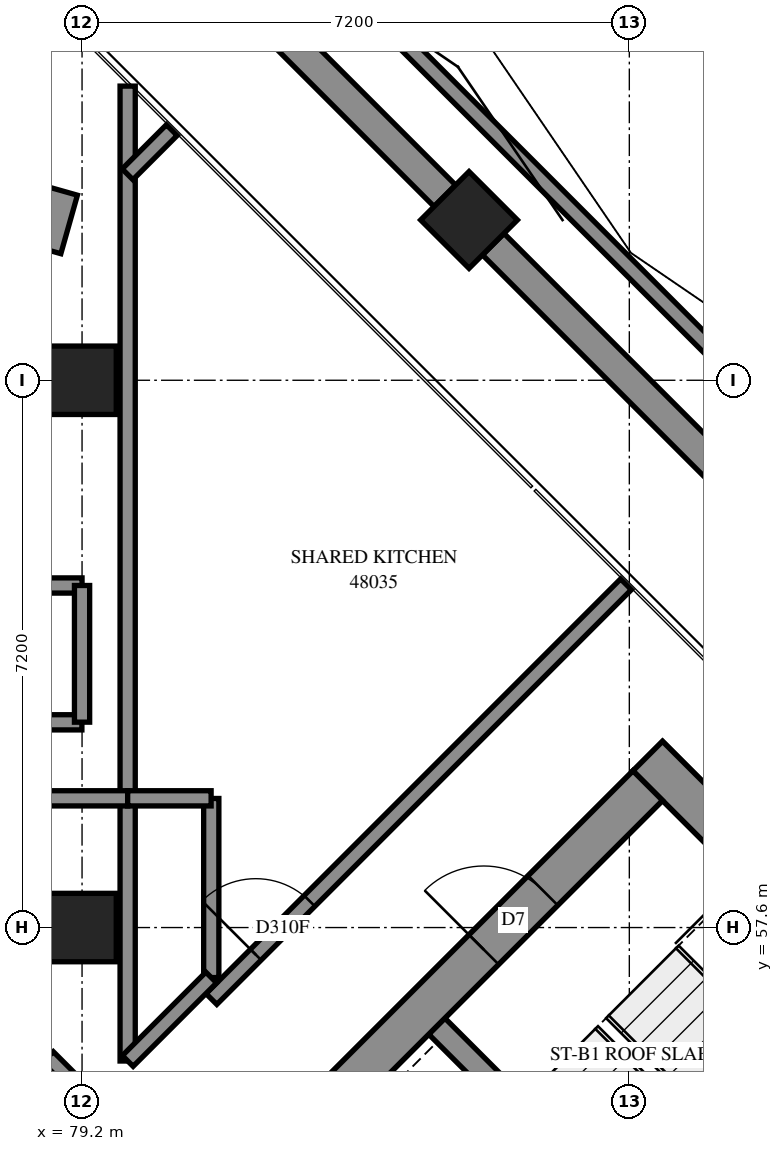
"""IFC4 building model, lengths in metres.
Left out: names, types, materials, properties, quantities, classifications, styles, units other than length and angle.
Written with IfcOpenShell. Run it as: python <this file> out.ifc"""

import sys

from ifc_helpers import new_model, si_unit, direction, frame, frame_2d, origin, origin_2d, place, context, subcontext, project, spatial, polyline, rectangle, outline, extrude, element, fill, save


model = new_model("IFC4")
c1 = context("Model", 3, precision=1e-05, world=origin(), true_north=direction((0.0, 1.0)))
c2 = subcontext(c1, "Body", "Model", "MODEL_VIEW")
j1 = project(units=[si_unit("LENGTHUNIT", "METRE"), si_unit("PLANEANGLEUNIT", "RADIAN")], contexts=[c1])
p1 = place(None, origin())
s1 = spatial("IfcSite", under=j1, at=p1, CompositionType="ELEMENT")
p2 = place(p1, origin())
s2 = spatial("IfcBuilding", under=s1, at=p2, CompositionType="ELEMENT")
p3 = place(p2, frame((0.0, 0.0, 176.2)))
s3 = spatial("IfcBuildingStorey", under=s2, at=p3, CompositionType="ELEMENT", Elevation=176.2)
for number, where, z_axis, x_axis in (
    (1, (79.2, 57.6, 0.0), (0.0, 0.0, 1.0), (1.0, 0.0, 0.0)),
    (2, (79.2, 64.8, 0.0), (0.0, 0.0, 1.0), (1.0, 0.0, 0.0)),
    (3, (84.291, 66.909, 0.0), (0.0, 0.0, 1.0), (0.707, -0.707, 0.0)),
):
    element("IfcColumn", number, at=place(p3, frame(where, z_axis=z_axis, x_axis=x_axis)), inside=s3, PredefinedType="COLUMN", context=c2, shape_type="SweptSolid", body=[
        extrude(rectangle(XDim=0.9, YDim=0.9, at=origin_2d()), origin(), (0.0, 0.0, 1.0), 3.9),
    ])
p4 = place(p3, frame((86.642, 59.855, -0.3), z_axis=(0.0, 0.0, 1.0), x_axis=(0.707110007, -0.7071035554, 0.0)))
e4 = element("IfcWall", 4, at=p4, inside=s3, PredefinedType="SHEAR", context=c2, shape_type="SweptSolid", body=[
    extrude(rectangle(XDim=15.5, YDim=0.55, at=frame_2d((7.75, 0.0))), origin(), (0.0, 0.0, 1.0), 3.5),
])
p5 = place(p4, frame((10.55, 0.0, 0.3)))
e5 = element("IfcOpeningElement", 5, at=p5, cuts=e4, PredefinedType="OPENING", context=c2, shape_type="SweptSolid", body=[
    extrude(rectangle(XDim=0.8, YDim=2.1, at=frame_2d((0.4, 1.05))), frame((0.0, 0.285, 0.0), z_axis=(0.0, -1.0, 0.0), x_axis=(1.0, 0.0, 0.0)), (0.0, 0.0, 1.0), 0.57),
])
p6 = place(p3, frame((76.46, 49.284, -0.3), z_axis=(0.0, 0.0, 1.0), x_axis=(0.7071067812, 0.7071067812, 0.0)))
e6 = element("IfcWall", 6, at=p6, inside=s3, PredefinedType="SHEAR", context=c2, shape_type="SweptSolid", body=[
    extrude(rectangle(XDim=14.4, YDim=0.55, at=frame_2d((7.2, 0.0))), origin(), (0.0, 0.0, 1.0), 3.5),
])
p7 = place(p6, frame((4.55, 0.0, 0.3)))
e7 = element("IfcOpeningElement", 7, at=p7, cuts=e6, PredefinedType="OPENING", context=c2, shape_type="SweptSolid", body=[
    extrude(rectangle(XDim=1.1, YDim=2.1, at=frame_2d((0.55, 1.05))), frame((0.0, 0.285, 0.0), z_axis=(0.0, -1.0, 0.0), x_axis=(1.0, 0.0, 0.0)), (0.0, 0.0, 1.0), 0.57),
])
p8 = place(p6, frame((11.35, 0.0, 0.3)))
e8 = element("IfcOpeningElement", 8, at=p8, cuts=e6, PredefinedType="OPENING", context=c2, shape_type="SweptSolid", body=[
    extrude(rectangle(XDim=1.1, YDim=2.1, at=frame_2d((0.55, 1.05))), frame((0.0, 0.285, 0.0), z_axis=(0.0, -1.0, 0.0), x_axis=(1.0, 0.0, 0.0)), (0.0, 0.0, 1.0), 0.57),
])
p9 = place(p3, frame((83.867, 56.302, 0.0), z_axis=(0.0, 0.0, 1.0), x_axis=(0.7071137256, -0.7070998367, 0.0)))
e9 = element("IfcWall", 9, at=p9, inside=s3, PredefinedType="SOLIDWALL", context=c2, shape_type="SweptSolid", body=[
    extrude(rectangle(XDim=7.2, YDim=0.3, at=frame_2d((3.6, 0.0))), origin(), (0.0, 0.0, 1.0), 3.9),
])
p10 = place(p3, frame((79.03, 66.85, 0.0), z_axis=(0.0, 0.0, 1.0), x_axis=(-0.9622591579, 0.2721347332, 0.0)))
e10 = element("IfcWall", 10, at=p10, inside=s3, PredefinedType="SOLIDWALL", context=c2, shape_type="SweptSolid", body=[
    extrude(rectangle(XDim=3.024, YDim=0.8, at=frame_2d((1.512, 0.0))), origin(), (0.0, 0.0, 1.0), 0.65),
])
p11 = place(p3, frame((102.747, 49.938, 0.0), z_axis=(0.0, 0.0, 1.0), x_axis=(-0.7071083109, 0.7071052514, 0.0)))
e11 = element("IfcWall", 11, at=p11, inside=s3, PredefinedType="SOLIDWALL", context=c2, shape_type="SweptSolid", body=[
    extrude(outline(polyline([(-0.1, -0.1), (32.726, -0.1), (32.644, 0.1), (0.1, 0.1), (-0.1, -0.1)])), origin(), (0.0, 0.0, 1.0), 4.2),
])
p12 = place(p3, frame((79.8, 59.3, 0.0), z_axis=(0.0, 0.0, 1.0), x_axis=(0.0, 1.0, 0.0)))
e12 = element("IfcWall", 12, at=p12, inside=s3, PredefinedType="PARTITIONING", context=c2, shape_type="SweptSolid", body=[
    extrude(rectangle(XDim=9.37, YDim=0.2, at=frame_2d((4.685, 0.0))), origin(), (0.0, 0.0, 1.0), 3.9),
])
p13 = place(p3, frame((80.902, 56.66, 0.0), z_axis=(0.0, 0.0, 1.0), x_axis=(0.7069771439, 0.7072363947, 0.0)))
e13 = element("IfcWall", 13, at=p13, inside=s3, PredefinedType="PARTITIONING", context=c2, shape_type="SweptSolid", body=[
    extrude(rectangle(XDim=7.715, YDim=0.2, at=frame_2d((3.857, 0.0))), origin(), (0.0, 0.0, 1.0), 3.9),
])
p14 = place(p13, frame((0.825, 0.0, 0.0)))
e14 = element("IfcOpeningElement", 14, at=p14, cuts=e13, PredefinedType="OPENING", context=c2, shape_type="SweptSolid", body=[
    extrude(rectangle(XDim=1.0, YDim=2.1, at=frame_2d((0.5, 1.05))), frame((0.0, 0.11, 0.0), z_axis=(0.0, -1.0, 0.0), x_axis=(1.0, 0.0, 0.0)), (0.0, 0.0, 1.0), 0.22),
])
p15 = place(p3, frame((75.1, 62.1, 0.0), z_axis=(0.0, 0.0, 1.0), x_axis=(1.0, 0.0, 0.0)))
e15 = element("IfcWall", 15, at=p15, inside=s3, PredefinedType="PARTITIONING", context=c2, shape_type="SweptSolid", body=[
    extrude(rectangle(XDim=4.1, YDim=0.2, at=frame_2d((2.05, 0.0))), origin(), (0.0, 0.0, 1.0), 3.9),
])
p16 = place(p3, frame((79.8, 55.844, 0.0), z_axis=(0.0, 0.0, 1.0), x_axis=(0.0, 1.0, 0.0)))
e16 = element("IfcWall", 16, at=p16, inside=s3, PredefinedType="PARTITIONING", context=c2, shape_type="SweptSolid", body=[
    extrude(rectangle(XDim=3.456, YDim=0.2, at=frame_2d((1.728, 0.0))), origin(), (0.0, 0.0, 1.0), 3.9),
])
p17 = place(p3, frame((80.9, 56.942, 0.0), z_axis=(0.0, 0.0, 1.0), x_axis=(0.0, 1.0, 0.0)))
e17 = element("IfcWall", 17, at=p17, inside=s3, PredefinedType="PARTITIONING", context=c2, shape_type="SweptSolid", body=[
    extrude(rectangle(XDim=2.356, YDim=0.2, at=frame_2d((1.178, 0.0))), origin(), (0.0, 0.0, 1.0), 3.9),
])
p18 = place(p3, frame((76.902, 60.3, 0.0), z_axis=(0.0, 0.0, 1.0), x_axis=(1.0, 0.0, 0.0)))
e18 = element("IfcWall", 18, at=p18, inside=s3, PredefinedType="PARTITIONING", context=c2, shape_type="SweptSolid", body=[
    extrude(rectangle(XDim=2.296, YDim=0.2, at=frame_2d((1.148, 0.0))), origin(), (0.0, 0.0, 1.0), 3.9),
])
p19 = place(p18, frame((0.825, 0.0, 0.0)))
e19 = element("IfcOpeningElement", 19, at=p19, cuts=e18, PredefinedType="OPENING", context=c2, shape_type="SweptSolid", body=[
    extrude(rectangle(XDim=1.0, YDim=2.1, at=frame_2d((0.5, 1.05))), frame((0.0, 0.11, 0.0), z_axis=(0.0, -1.0, 0.0), x_axis=(1.0, 0.0, 0.0)), (0.0, 0.0, 1.0), 0.22),
])
p20 = place(p3, frame((77.9, 59.3, 0.0), z_axis=(0.0, 0.0, 1.0), x_axis=(1.0, 0.0, 0.0)))
e20 = element("IfcWall", 20, at=p20, inside=s3, PredefinedType="PARTITIONING", context=c2, shape_type="SweptSolid", body=[
    extrude(rectangle(XDim=1.9, YDim=0.2, at=frame_2d((0.95, 0.0))), origin(), (0.0, 0.0, 1.0), 3.9),
])
p21 = place(p3, frame((79.2, 60.302, 0.0), z_axis=(0.0, 0.0, 1.0), x_axis=(0.0, 1.0, 0.0)))
e21 = element("IfcWall", 21, at=p21, inside=s3, PredefinedType="PARTITIONING", context=c2, shape_type="SweptSolid", body=[
    extrude(rectangle(XDim=1.798, YDim=0.2, at=frame_2d((0.899, 0.0))), origin(), (0.0, 0.0, 1.0), 3.9),
])
p22 = place(p3, frame((79.801, 55.845, 0.0), z_axis=(0.0, 0.0, 1.0), x_axis=(0.7071067812, 0.7071067812, 0.0)))
e22 = element("IfcWall", 22, at=p22, inside=s3, PredefinedType="PARTITIONING", context=c2, shape_type="SweptSolid", body=[
    extrude(rectangle(XDim=1.553, YDim=0.2, at=frame_2d((0.776, 0.0))), origin(), (0.0, 0.0, 1.0), 3.9),
])
p23 = place(p3, frame((79.8, 59.3, 0.0), z_axis=(0.0, 0.0, 1.0), x_axis=(1.0, 0.0, 0.0)))
e23 = element("IfcWall", 23, at=p23, inside=s3, PredefinedType="PARTITIONING", context=c2, shape_type="SweptSolid", body=[
    extrude(rectangle(XDim=1.098, YDim=0.2, at=frame_2d((0.549, 0.0))), origin(), (0.0, 0.0, 1.0), 3.9),
])
p24 = place(p3, frame((79.799, 67.509, 0.0), z_axis=(0.0, 0.0, 1.0), x_axis=(0.7071067812, 0.7071067812, 0.0)))
e24 = element("IfcWall", 24, at=p24, inside=s3, PredefinedType="PARTITIONING", context=c2, shape_type="SweptSolid", body=[
    extrude(rectangle(XDim=0.823, YDim=0.2, at=frame_2d((0.412, 0.0))), origin(), (0.0, 0.0, 1.0), 3.9),
])
p25 = place(p3, frame((78.751, 55.897, 0.0), z_axis=(0.0, 0.0, 1.0), x_axis=(0.7071067812, -0.7071067812, 0.0)))
e25 = element("IfcWall", 25, at=p25, inside=s3, PredefinedType="PARTITIONING", context=c2, shape_type="SweptSolid", body=[
    extrude(rectangle(XDim=0.781, YDim=0.2, at=frame_2d((0.39, 0.0))), origin(), (0.0, 0.0, 1.0), 3.9),
])
p26 = place(p8, origin())
e26 = element("IfcDoor", 26, at=p26, inside=s3, OperationType="SINGLE_SWING_LEFT", PredefinedType="DOOR", context=c2, shape_type="SweptSolid", body=[
    extrude(rectangle(XDim=1.1, YDim=2.1, at=frame_2d((0.55, 1.05))), frame((0.0, 0.025, 0.0), z_axis=(0.0, -1.0, 0.0), x_axis=(1.0, 0.0, 0.0)), (0.0, 0.0, 1.0), 0.05),
])
fill(e8, e26)
p27 = place(p14, origin())
e27 = element("IfcDoor", 27, at=p27, inside=s3, OperationType="SINGLE_SWING_RIGHT", PredefinedType="DOOR", context=c2, shape_type="SweptSolid", body=[
    extrude(rectangle(XDim=1.0, YDim=2.1, at=frame_2d((0.5, 1.05))), frame((0.0, 0.025, 0.0), z_axis=(0.0, -1.0, 0.0), x_axis=(1.0, 0.0, 0.0)), (0.0, 0.0, 1.0), 0.05),
])
fill(e14, e27)
save(model, sys.argv[1])
